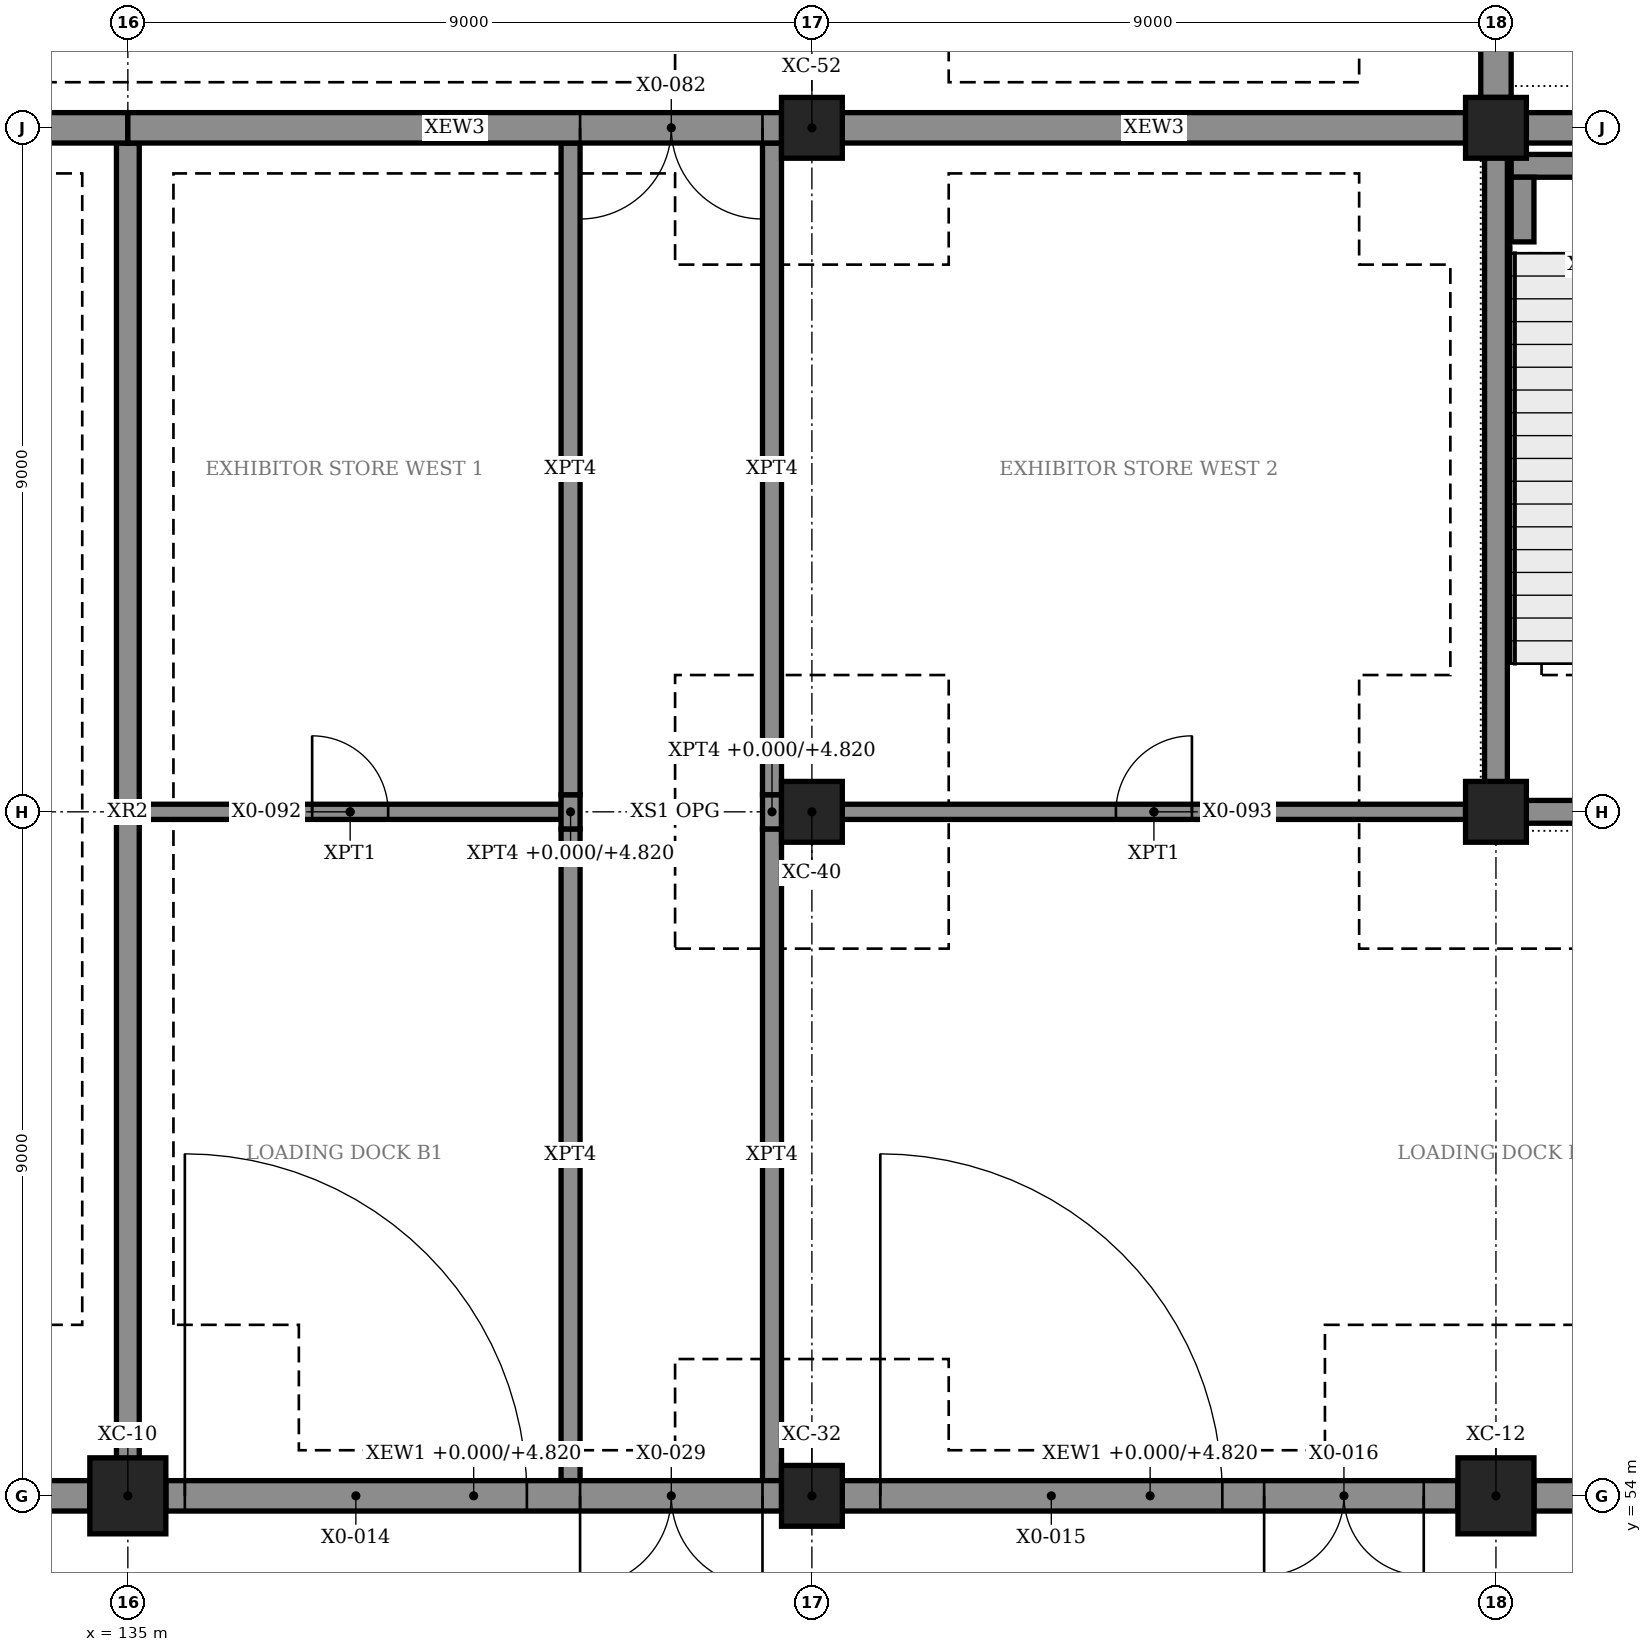
"""IFC4 building model, lengths in metres.
Left out: names, types, materials, properties, quantities, classifications, styles, units other than length and angle.
Written with IfcOpenShell. Run it as: python <this file> out.ifc"""

import sys

from ifc_helpers import new_model, si_unit, direction, frame, frame_2d, origin, origin_2d, place, context, subcontext, project, spatial, rectangle, hollow_rectangle, extrude, element, fill, save


model = new_model("IFC4")
c1 = context("Model", 3, precision=1e-05, world=origin(), true_north=direction((0.0, 1.0)))
c2 = subcontext(c1, "Body", "Model", "MODEL_VIEW")
j1 = project(units=[si_unit("LENGTHUNIT", "METRE"), si_unit("PLANEANGLEUNIT", "RADIAN")], contexts=[c1])
p1 = place(None, origin())
s1 = spatial("IfcSite", under=j1, at=p1, CompositionType="ELEMENT")
p2 = place(p1, origin())
s2 = spatial("IfcBuilding", under=s1, at=p2, CompositionType="ELEMENT")
p3 = place(p2, origin())
s3 = spatial("IfcBuildingStorey", under=s2, at=p3, CompositionType="ELEMENT", Elevation=0.0)
for number, where, z_axis, x_axis in (
    (1, (135.0, 54.0, 0.0), (0.0, 0.0, 1.0), (1.0, 0.0, 0.0)),
    (2, (153.0, 54.0, 0.0), (0.0, 0.0, 1.0), (1.0, 0.0, 0.0)),
):
    element("IfcColumn", number, at=place(p3, frame(where, z_axis=z_axis, x_axis=x_axis)), inside=s3, PredefinedType="COLUMN", context=c2, shape_type="SweptSolid", body=[
        extrude(hollow_rectangle(XDim=1.0, YDim=1.0, WallThickness=0.032, at=origin_2d()), origin(), (0.0, 0.0, 1.0), 6.0),
    ])
for number, where, z_axis, x_axis in (
    (3, (144.0, 54.0, 0.0), (0.0, 0.0, 1.0), (1.0, 0.0, 0.0)),
    (4, (144.0, 63.0, 0.0), (0.0, 0.0, 1.0), (1.0, 0.0, 0.0)),
    (5, (153.0, 63.0, 0.0), (0.0, 0.0, 1.0), (1.0, 0.0, 0.0)),
    (6, (144.0, 72.0, 0.0), (0.0, 0.0, 1.0), (1.0, 0.0, 0.0)),
    (7, (153.0, 72.0, 0.0), (0.0, 0.0, 1.0), (1.0, 0.0, 0.0)),
):
    element("IfcColumn", number, at=place(p3, frame(where, z_axis=z_axis, x_axis=x_axis)), inside=s3, PredefinedType="COLUMN", context=c2, shape_type="SweptSolid", body=[
        extrude(rectangle(XDim=0.8, YDim=0.8, at=origin_2d()), origin(), (0.0, 0.0, 1.0), 6.0),
    ])
p4 = place(p3, frame((152.85, 63.0, 0.0), z_axis=(0.0, 0.0, 1.0), x_axis=(1.0, 0.0, 0.0)))
e8 = element("IfcWall", 8, at=p4, inside=s3, PredefinedType="SHEAR", context=c2, shape_type="SweptSolid", body=[
    extrude(rectangle(XDim=9.3, YDim=0.3, at=frame_2d((4.65, 0.0))), origin(), (0.0, 0.0, 1.0), 6.0),
])
p5 = place(p4, frame((1.325, 0.0, 0.0)))
e9 = element("IfcOpeningElement", 9, at=p5, cuts=e8, PredefinedType="OPENING", context=c2, shape_type="SweptSolid", body=[
    extrude(rectangle(XDim=1.8, YDim=2.4, at=frame_2d((0.9, 1.2))), frame((0.0, 0.16, 0.0), z_axis=(0.0, -1.0, 0.0), x_axis=(1.0, 0.0, 0.0)), (0.0, 0.0, 1.0), 0.32),
])
p6 = place(p4, frame((4.6, 0.0, 0.0)))
e10 = element("IfcOpeningElement", 10, at=p6, cuts=e8, PredefinedType="OPENING", context=c2, shape_type="SweptSolid", body=[
    extrude(rectangle(XDim=2.1, YDim=2.4, at=frame_2d((1.05, 1.2))), frame((0.0, 0.16, 0.0), z_axis=(0.0, -1.0, 0.0), x_axis=(1.0, 0.0, 0.0)), (0.0, 0.0, 1.0), 0.32),
])
p7 = place(p4, frame((7.575, 0.0, 0.0)))
e11 = element("IfcOpeningElement", 11, at=p7, cuts=e8, PredefinedType="OPENING", context=c2, shape_type="SweptSolid", body=[
    extrude(rectangle(XDim=1.0, YDim=2.4, at=frame_2d((0.5, 1.2))), frame((0.0, 0.16, 0.0), z_axis=(0.0, -1.0, 0.0), x_axis=(1.0, 0.0, 0.0)), (0.0, 0.0, 1.0), 0.32),
])
p8 = place(p3, frame((153.0, 63.15, 0.0), z_axis=(0.0, 0.0, 1.0), x_axis=(0.0, 1.0, 0.0)))
e12 = element("IfcWall", 12, at=p8, inside=s3, PredefinedType="SHEAR", context=c2, shape_type="SweptSolid", body=[
    extrude(rectangle(XDim=8.65, YDim=0.3, at=frame_2d((4.325, 0.0))), origin(), (0.0, 0.0, 1.0), 6.0),
])
p9 = place(p3, frame((135.0, 54.2, 0.0), z_axis=(0.0, 0.0, 1.0), x_axis=(0.0, 1.0, 0.0)))
e13 = element("IfcWall", 13, at=p9, inside=s3, PredefinedType="SOLIDWALL", context=c2, shape_type="SweptSolid", body=[
    extrude(rectangle(XDim=17.6, YDim=0.3, at=frame_2d((8.8, 0.0))), origin(), (0.0, 0.0, 1.0), 5.72),
])
p10 = place(p3, frame((126.0, 54.0, 0.0), z_axis=(0.0, 0.0, 1.0), x_axis=(1.0, 0.0, 0.0)))
e14 = element("IfcWall", 14, at=p10, inside=s3, PredefinedType="SOLIDWALL", context=c2, shape_type="SweptSolid", body=[
    extrude(rectangle(XDim=8.5, YDim=0.4, at=frame_2d((4.25, 0.0))), origin(), (0.0, 0.0, 1.0), 5.3),
])
p11 = place(p10, frame((1.9, 0.0, 0.0)))
e15 = element("IfcOpeningElement", 15, at=p11, cuts=e14, PredefinedType="OPENING", context=c2, shape_type="SweptSolid", body=[
    extrude(rectangle(XDim=5.2, YDim=5.2, at=frame_2d((2.6, 2.6))), frame((0.0, 0.21, 0.0), z_axis=(0.0, -1.0, 0.0), x_axis=(1.0, 0.0, 0.0)), (0.0, 0.0, 1.0), 0.42),
])
p12 = place(p3, frame((135.5, 54.0, 0.0), z_axis=(0.0, 0.0, 1.0), x_axis=(1.0, 0.0, 0.0)))
e16 = element("IfcWall", 16, at=p12, inside=s3, PredefinedType="SOLIDWALL", context=c2, shape_type="SweptSolid", body=[
    extrude(rectangle(XDim=8.1, YDim=0.4, at=frame_2d((4.05, 0.0))), origin(), (0.0, 0.0, 1.0), 4.82),
])
p13 = place(p12, frame((0.25, 0.0, 0.0)))
e17 = element("IfcOpeningElement", 17, at=p13, cuts=e16, PredefinedType="OPENING", context=c2, shape_type="SweptSolid", body=[
    extrude(rectangle(XDim=4.5, YDim=4.5, at=frame_2d((2.25, 2.25))), frame((0.0, 0.21, 0.0), z_axis=(0.0, -1.0, 0.0), x_axis=(1.0, 0.0, 0.0)), (0.0, 0.0, 1.0), 0.42),
])
p14 = place(p12, frame((5.45, 0.0, 0.0)))
e18 = element("IfcOpeningElement", 18, at=p14, cuts=e16, PredefinedType="OPENING", context=c2, shape_type="SweptSolid", body=[
    extrude(rectangle(XDim=2.4, YDim=2.4, at=frame_2d((1.2, 1.2))), frame((0.0, 0.21, 0.0), z_axis=(0.0, -1.0, 0.0), x_axis=(1.0, 0.0, 0.0)), (0.0, 0.0, 1.0), 0.42),
])
p15 = place(p3, frame((144.4, 54.0, 0.0), z_axis=(0.0, 0.0, 1.0), x_axis=(1.0, 0.0, 0.0)))
e19 = element("IfcWall", 19, at=p15, inside=s3, PredefinedType="SOLIDWALL", context=c2, shape_type="SweptSolid", body=[
    extrude(rectangle(XDim=8.1, YDim=0.4, at=frame_2d((4.05, 0.0))), origin(), (0.0, 0.0, 1.0), 4.82),
])
p16 = place(p15, frame((0.5, 0.0, 0.0)))
e20 = element("IfcOpeningElement", 20, at=p16, cuts=e19, PredefinedType="OPENING", context=c2, shape_type="SweptSolid", body=[
    extrude(rectangle(XDim=4.5, YDim=4.5, at=frame_2d((2.25, 2.25))), frame((0.0, 0.21, 0.0), z_axis=(0.0, -1.0, 0.0), x_axis=(1.0, 0.0, 0.0)), (0.0, 0.0, 1.0), 0.42),
])
p17 = place(p15, frame((5.55, 0.0, 0.0)))
e21 = element("IfcOpeningElement", 21, at=p17, cuts=e19, PredefinedType="OPENING", context=c2, shape_type="SweptSolid", body=[
    extrude(rectangle(XDim=2.1, YDim=2.4, at=frame_2d((1.05, 1.2))), frame((0.0, 0.21, 0.0), z_axis=(0.0, -1.0, 0.0), x_axis=(1.0, 0.0, 0.0)), (0.0, 0.0, 1.0), 0.42),
])
p18 = place(p3, frame((153.5, 54.0, 0.0), z_axis=(0.0, 0.0, 1.0), x_axis=(1.0, 0.0, 0.0)))
e22 = element("IfcWall", 22, at=p18, inside=s3, PredefinedType="SOLIDWALL", context=c2, shape_type="SweptSolid", body=[
    extrude(rectangle(XDim=8.1, YDim=0.4, at=frame_2d((4.05, 0.0))), origin(), (0.0, 0.0, 1.0), 4.82),
])
p19 = place(p18, frame((1.75, 0.0, 0.0)))
e23 = element("IfcOpeningElement", 23, at=p19, cuts=e22, PredefinedType="OPENING", context=c2, shape_type="SweptSolid", body=[
    extrude(rectangle(XDim=4.5, YDim=4.5, at=frame_2d((2.25, 2.25))), frame((0.0, 0.21, 0.0), z_axis=(0.0, -1.0, 0.0), x_axis=(1.0, 0.0, 0.0)), (0.0, 0.0, 1.0), 0.42),
])
p20 = place(p3, frame((126.0, 72.0, 0.0), z_axis=(0.0, 0.0, 1.0), x_axis=(1.0, 0.0, 0.0)))
e24 = element("IfcWall", 24, at=p20, inside=s3, PredefinedType="SOLIDWALL", context=c2, shape_type="SweptSolid", body=[
    extrude(rectangle(XDim=9.0, YDim=0.4, at=frame_2d((4.5, 0.0))), origin(), (0.0, 0.0, 1.0), 5.3),
])
p21 = place(p20, frame((1.9, 0.0, 0.0)))
e25 = element("IfcOpeningElement", 25, at=p21, cuts=e24, PredefinedType="OPENING", context=c2, shape_type="SweptSolid", body=[
    extrude(rectangle(XDim=5.2, YDim=5.2, at=frame_2d((2.6, 2.6))), frame((0.0, 0.21, 0.0), z_axis=(0.0, -1.0, 0.0), x_axis=(1.0, 0.0, 0.0)), (0.0, 0.0, 1.0), 0.42),
])
p22 = place(p3, frame((135.0, 72.0, 0.0), z_axis=(0.0, 0.0, 1.0), x_axis=(1.0, 0.0, 0.0)))
e26 = element("IfcWall", 26, at=p22, inside=s3, PredefinedType="SOLIDWALL", context=c2, shape_type="SweptSolid", body=[
    extrude(rectangle(XDim=8.6, YDim=0.4, at=frame_2d((4.3, 0.0))), origin(), (0.0, 0.0, 1.0), 4.82),
])
p23 = place(p22, frame((5.95, 0.0, 0.0)))
e27 = element("IfcOpeningElement", 27, at=p23, cuts=e26, PredefinedType="OPENING", context=c2, shape_type="SweptSolid", body=[
    extrude(rectangle(XDim=2.4, YDim=2.4, at=frame_2d((1.2, 1.2))), frame((0.0, 0.21, 0.0), z_axis=(0.0, -1.0, 0.0), x_axis=(1.0, 0.0, 0.0)), (0.0, 0.0, 1.0), 0.42),
])
for number, where, z_axis, x_axis in (
    (28, (144.4, 72.0, 0.0), (0.0, 0.0, 1.0), (1.0, 0.0, 0.0)),
    (29, (153.4, 72.0, 0.0), (0.0, 0.0, 1.0), (1.0, 0.0, 0.0)),
):
    element("IfcWall", number, at=place(p3, frame(where, z_axis=z_axis, x_axis=x_axis)), inside=s3, PredefinedType="SOLIDWALL", context=c2, shape_type="SweptSolid", body=[
        extrude(rectangle(XDim=8.2, YDim=0.4, at=frame_2d((4.1, 0.0))), origin(), (0.0, 0.0, 1.0), 4.82),
    ])
p24 = place(p3, frame((153.0, 72.4, 0.0), z_axis=(0.0, 0.0, 1.0), x_axis=(0.0, 1.0, 0.0)))
e30 = element("IfcWall", 30, at=p24, inside=s3, PredefinedType="SOLIDWALL", context=c2, shape_type="SweptSolid", body=[
    extrude(rectangle(XDim=8.2, YDim=0.4, at=frame_2d((4.1, 0.0))), origin(), (0.0, 0.0, 1.0), 6.0),
])
p25 = place(p3, frame((153.2, 71.5, 0.0), z_axis=(0.0, 0.0, 1.0), x_axis=(1.0, 0.0, 0.0)))
e31 = element("IfcWall", 31, at=p25, inside=s3, PredefinedType="SHEAR", context=c2, shape_type="SweptSolid", body=[
    extrude(rectangle(XDim=3.75, YDim=0.3, at=frame_2d((1.875, 0.0))), origin(), (0.0, 0.0, 1.0), 2.8),
])
p26 = place(p3, frame((153.35, 70.499, 0.0), z_axis=(0.0, 0.0, 1.0), x_axis=(0.0, 1.0, 0.0)))
e32 = element("IfcWall", 32, at=p26, inside=s3, PredefinedType="SHEAR", context=c2, shape_type="SweptSolid", body=[
    extrude(rectangle(XDim=0.851, YDim=0.3, at=frame_2d((0.425, 0.0))), origin(), (0.0, 0.0, 1.0), 2.8),
])
p27 = place(p3, frame((135.15, 63.0, 0.0), z_axis=(0.0, 0.0, 1.0), x_axis=(1.0, 0.0, 0.0)))
e33 = element("IfcWall", 33, at=p27, inside=s3, PredefinedType="PARTITIONING", context=c2, shape_type="SweptSolid", body=[
    extrude(rectangle(XDim=5.55, YDim=0.2, at=frame_2d((2.775, 0.0))), origin(), (0.0, 0.0, 1.0), 4.82),
])
p28 = place(p27, frame((2.275, 0.0, 0.015)))
e34 = element("IfcOpeningElement", 34, at=p28, cuts=e33, PredefinedType="OPENING", context=c2, shape_type="SweptSolid", body=[
    extrude(rectangle(XDim=1.0, YDim=2.4, at=frame_2d((0.5, 1.2))), frame((0.0, 0.11, 0.0), z_axis=(0.0, -1.0, 0.0), x_axis=(1.0, 0.0, 0.0)), (0.0, 0.0, 1.0), 0.22),
])
p29 = place(p3, frame((144.4, 63.0, 0.0), z_axis=(0.0, 0.0, 1.0), x_axis=(1.0, 0.0, 0.0)))
e35 = element("IfcWall", 35, at=p29, inside=s3, PredefinedType="PARTITIONING", context=c2, shape_type="SweptSolid", body=[
    extrude(rectangle(XDim=8.2, YDim=0.2, at=frame_2d((4.1, 0.0))), origin(), (0.0, 0.0, 1.0), 4.82),
])
p30 = place(p29, frame((3.6, 0.0, 0.015)))
e36 = element("IfcOpeningElement", 36, at=p30, cuts=e35, PredefinedType="OPENING", context=c2, shape_type="SweptSolid", body=[
    extrude(rectangle(XDim=1.0, YDim=2.4, at=frame_2d((0.5, 1.2))), frame((0.0, 0.11, 0.0), z_axis=(0.0, -1.0, 0.0), x_axis=(1.0, 0.0, 0.0)), (0.0, 0.0, 1.0), 0.22),
])
p31 = place(p3, frame((140.825, 54.2, 0.0), z_axis=(0.0, 0.0, 1.0), x_axis=(0.0, 1.0, 0.0)))
e37 = element("IfcWall", 37, at=p31, inside=s3, PredefinedType="PARTITIONING", context=c2, shape_type="SweptSolid", body=[
    extrude(rectangle(XDim=8.575, YDim=0.25, at=frame_2d((4.288, 0.0))), origin(), (0.0, 0.0, 1.0), 5.72),
])
p32 = place(p3, frame((140.825, 62.775, 0.0), z_axis=(0.0, 0.0, 1.0), x_axis=(0.0, 1.0, 0.0)))
e38 = element("IfcWall", 38, at=p32, inside=s3, PredefinedType="PARTITIONING", context=c2, shape_type="SweptSolid", body=[
    extrude(rectangle(XDim=0.45, YDim=0.25, at=frame_2d((0.225, 0.0))), origin(), (0.0, 0.0, 1.0), 4.82),
])
for number, where, z_axis, x_axis in (
    (39, (140.825, 63.225, 0.0), (0.0, 0.0, 1.0), (0.0, 1.0, 0.0)),
    (40, (143.475, 54.2, 0.0), (0.0, 0.0, 1.0), (0.0, 1.0, 0.0)),
):
    element("IfcWall", number, at=place(p3, frame(where, z_axis=z_axis, x_axis=x_axis)), inside=s3, PredefinedType="PARTITIONING", context=c2, shape_type="SweptSolid", body=[
        extrude(rectangle(XDim=8.575, YDim=0.25, at=frame_2d((4.288, 0.0))), origin(), (0.0, 0.0, 1.0), 5.72),
    ])
p33 = place(p3, frame((143.475, 62.775, 0.0), z_axis=(0.0, 0.0, 1.0), x_axis=(0.0, 1.0, 0.0)))
e41 = element("IfcWall", 41, at=p33, inside=s3, PredefinedType="PARTITIONING", context=c2, shape_type="SweptSolid", body=[
    extrude(rectangle(XDim=0.45, YDim=0.25, at=frame_2d((0.225, 0.0))), origin(), (0.0, 0.0, 1.0), 4.82),
])
p34 = place(p3, frame((143.475, 63.225, 0.0), z_axis=(0.0, 0.0, 1.0), x_axis=(0.0, 1.0, 0.0)))
e42 = element("IfcWall", 42, at=p34, inside=s3, PredefinedType="PARTITIONING", context=c2, shape_type="SweptSolid", body=[
    extrude(rectangle(XDim=8.575, YDim=0.25, at=frame_2d((4.288, 0.0))), origin(), (0.0, 0.0, 1.0), 5.72),
])
p35 = place(p13, origin())
e43 = element("IfcDoor", 43, at=p35, inside=s3, OperationType="ROLLINGUP", PredefinedType="DOOR", context=c2, shape_type="SweptSolid", body=[
    extrude(rectangle(XDim=4.5, YDim=4.5, at=frame_2d((2.25, 2.25))), frame((0.0, 0.025, 0.0), z_axis=(0.0, -1.0, 0.0), x_axis=(1.0, 0.0, 0.0)), (0.0, 0.0, 1.0), 0.05),
])
fill(e17, e43)
p36 = place(p16, origin())
e44 = element("IfcDoor", 44, at=p36, inside=s3, OperationType="ROLLINGUP", PredefinedType="DOOR", context=c2, shape_type="SweptSolid", body=[
    extrude(rectangle(XDim=4.5, YDim=4.5, at=frame_2d((2.25, 2.25))), frame((0.0, 0.025, 0.0), z_axis=(0.0, -1.0, 0.0), x_axis=(1.0, 0.0, 0.0)), (0.0, 0.0, 1.0), 0.05),
])
fill(e20, e44)
p37 = place(p17, frame((2.1, 0.0, 0.0), z_axis=(0.0, 0.0, 1.0), x_axis=(-1.0, 0.0, 0.0)))
e45 = element("IfcDoor", 45, at=p37, inside=s3, OperationType="DOUBLE_DOOR_SINGLE_SWING", PredefinedType="DOOR", context=c2, shape_type="SweptSolid", body=[
    extrude(rectangle(XDim=2.1, YDim=2.4, at=frame_2d((1.05, 1.2))), frame((0.0, 0.025, 0.0), z_axis=(0.0, -1.0, 0.0), x_axis=(1.0, 0.0, 0.0)), (0.0, 0.0, 1.0), 0.05),
])
fill(e21, e45)
p38 = place(p14, frame((2.4, 0.0, 0.0), z_axis=(0.0, 0.0, 1.0), x_axis=(-1.0, 0.0, 0.0)))
e46 = element("IfcDoor", 46, at=p38, inside=s3, OperationType="DOUBLE_DOOR_SINGLE_SWING", PredefinedType="DOOR", context=c2, shape_type="SweptSolid", body=[
    extrude(rectangle(XDim=2.4, YDim=2.4, at=frame_2d((1.2, 1.2))), frame((0.0, 0.025, 0.0), z_axis=(0.0, -1.0, 0.0), x_axis=(1.0, 0.0, 0.0)), (0.0, 0.0, 1.0), 0.05),
])
fill(e18, e46)
p39 = place(p23, frame((2.4, 0.0, 0.0), z_axis=(0.0, 0.0, 1.0), x_axis=(-1.0, 0.0, 0.0)))
e47 = element("IfcDoor", 47, at=p39, inside=s3, OperationType="DOUBLE_DOOR_SINGLE_SWING", PredefinedType="DOOR", context=c2, shape_type="SweptSolid", body=[
    extrude(rectangle(XDim=2.4, YDim=2.4, at=frame_2d((1.2, 1.2))), frame((0.0, 0.025, 0.0), z_axis=(0.0, -1.0, 0.0), x_axis=(1.0, 0.0, 0.0)), (0.0, 0.0, 1.0), 0.05),
])
fill(e27, e47)
p40 = place(p28, origin())
e48 = element("IfcDoor", 48, at=p40, inside=s3, OperationType="SINGLE_SWING_LEFT", PredefinedType="DOOR", context=c2, shape_type="SweptSolid", body=[
    extrude(rectangle(XDim=1.0, YDim=2.4, at=frame_2d((0.5, 1.2))), frame((0.0, 0.025, 0.0), z_axis=(0.0, -1.0, 0.0), x_axis=(1.0, 0.0, 0.0)), (0.0, 0.0, 1.0), 0.05),
])
fill(e34, e48)
p41 = place(p30, origin())
e49 = element("IfcDoor", 49, at=p41, inside=s3, OperationType="SINGLE_SWING_RIGHT", PredefinedType="DOOR", context=c2, shape_type="SweptSolid", body=[
    extrude(rectangle(XDim=1.0, YDim=2.4, at=frame_2d((0.5, 1.2))), frame((0.0, 0.025, 0.0), z_axis=(0.0, -1.0, 0.0), x_axis=(1.0, 0.0, 0.0)), (0.0, 0.0, 1.0), 0.05),
])
fill(e36, e49)
save(model, sys.argv[1])
